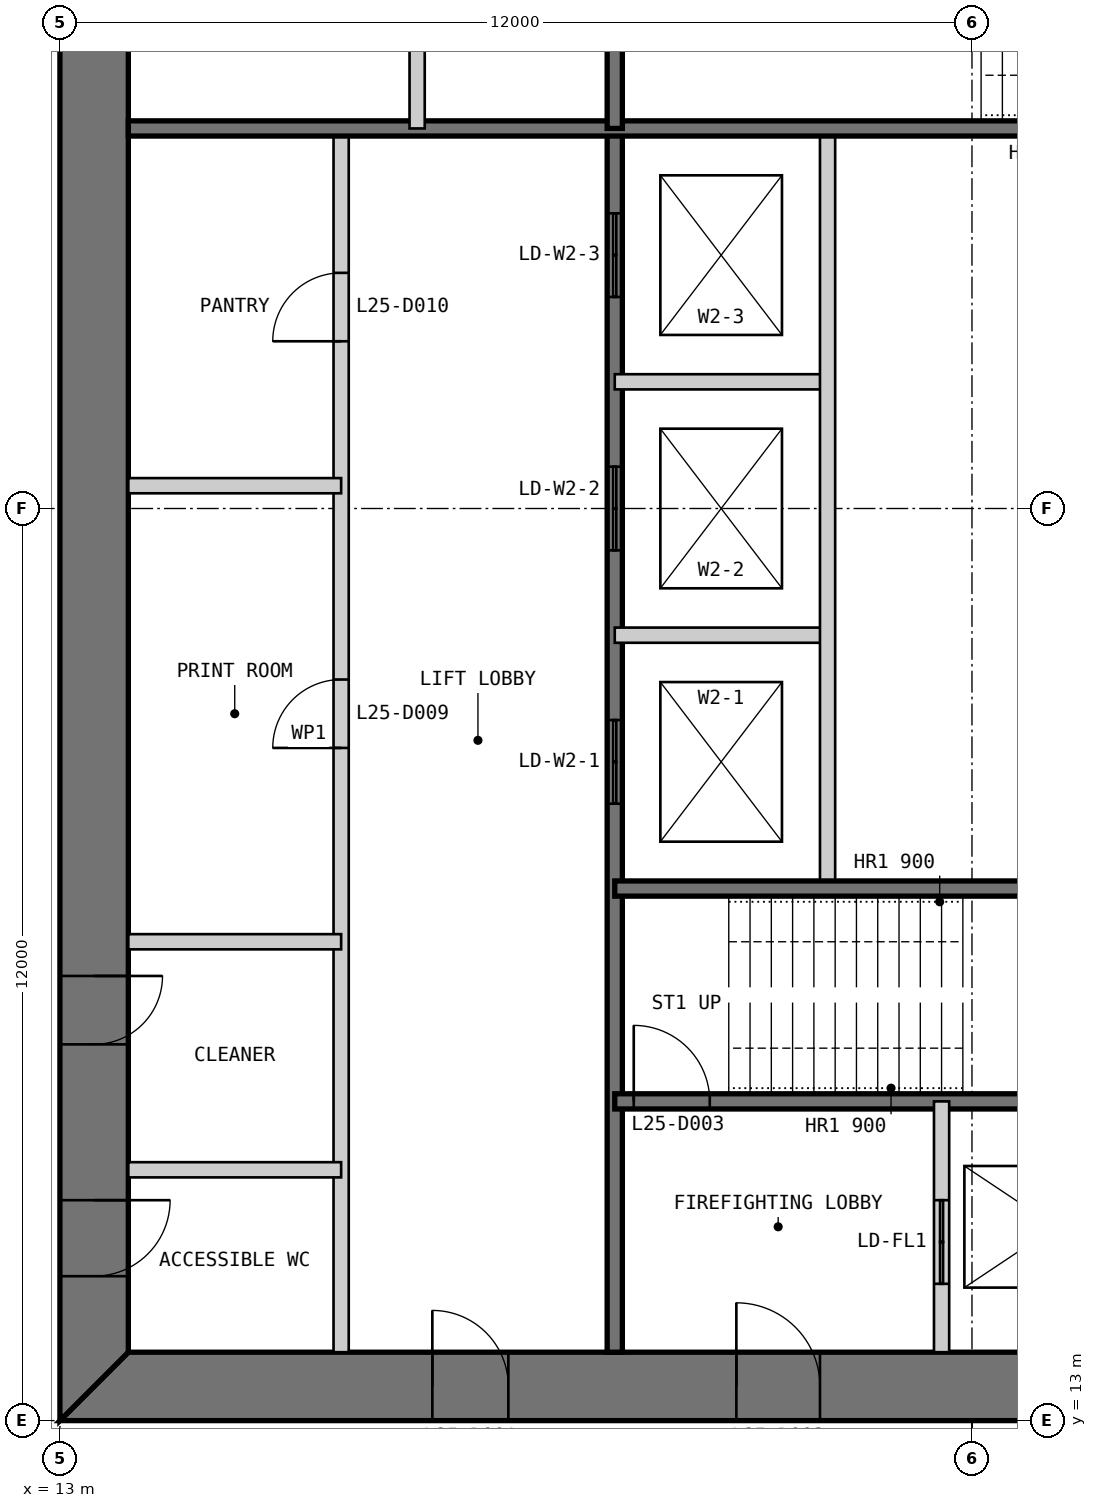
"""IFC4 building model, lengths in metres.
Left out: names, types, materials, properties, quantities, classifications, styles, units other than length and angle.
Written with IfcOpenShell. Run it as: python <this file> out.ifc"""

import sys

from ifc_helpers import new_model, si_unit, direction, frame, frame_2d, origin, place, context, subcontext, project, spatial, polyline, rectangle, outline, extrude, element, fill, save


model = new_model("IFC4")
c1 = context("Model", 3, precision=1e-05, world=origin(), true_north=direction((0.0, 1.0)))
c2 = subcontext(c1, "Body", "Model", "MODEL_VIEW")
j1 = project(units=[si_unit("LENGTHUNIT", "METRE"), si_unit("PLANEANGLEUNIT", "RADIAN")], contexts=[c1])
p1 = place(None, origin())
s1 = spatial("IfcSite", under=j1, at=p1, CompositionType="ELEMENT")
p2 = place(p1, origin())
s2 = spatial("IfcBuilding", under=s1, at=p2, CompositionType="ELEMENT")
p3 = place(p2, frame((0.0, 0.0, 110.4)))
s3 = spatial("IfcBuildingStorey", under=s2, at=p3, CompositionType="ELEMENT", Elevation=110.4)
p4 = place(p3, frame((13.0, 13.45, 0.0), z_axis=(0.0, 0.0, 1.0), x_axis=(1.0, 0.0, 0.0)))
e1 = element("IfcWall", 1, at=p4, inside=s3, PredefinedType="SHEAR", context=c2, shape_type="SweptSolid", body=[
    extrude(outline(polyline([(0.0, -0.45), (24.0, -0.45), (23.1, 0.45), (0.9, 0.45), (0.0, -0.45)])), origin(), (0.0, 0.0, 1.0), 4.0),
])
p5 = place(p4, frame((4.9, 0.0, 0.0)))
e2 = element("IfcOpeningElement", 2, at=p5, cuts=e1, PredefinedType="OPENING", context=c2, shape_type="SweptSolid", body=[
    extrude(rectangle(XDim=1.0, YDim=2.2, at=frame_2d((0.5, 1.1))), frame((0.0, 0.46, 0.0), z_axis=(0.0, -1.0, 0.0), x_axis=(1.0, 0.0, 0.0)), (0.0, 0.0, 1.0), 0.92),
])
p6 = place(p4, frame((8.9, 0.0, 0.0)))
e3 = element("IfcOpeningElement", 3, at=p6, cuts=e1, PredefinedType="OPENING", context=c2, shape_type="SweptSolid", body=[
    extrude(rectangle(XDim=1.1, YDim=2.2, at=frame_2d((0.55, 1.1))), frame((0.0, 0.46, 0.0), z_axis=(0.0, -1.0, 0.0), x_axis=(1.0, 0.0, 0.0)), (0.0, 0.0, 1.0), 0.92),
])
p7 = place(p4, frame((15.05, 0.0, 0.0)))
e4 = element("IfcOpeningElement", 4, at=p7, cuts=e1, PredefinedType="OPENING", context=c2, shape_type="SweptSolid", body=[
    extrude(rectangle(XDim=0.9, YDim=2.2, at=frame_2d((0.45, 1.1))), frame((0.0, 0.46, 0.0), z_axis=(0.0, -1.0, 0.0), x_axis=(1.0, 0.0, 0.0)), (0.0, 0.0, 1.0), 0.92),
])
p8 = place(p4, frame((17.9, 0.0, 0.0)))
e5 = element("IfcOpeningElement", 5, at=p8, cuts=e1, PredefinedType="OPENING", context=c2, shape_type="SweptSolid", body=[
    extrude(rectangle(XDim=1.0, YDim=2.2, at=frame_2d((0.5, 1.1))), frame((0.0, 0.46, 0.0), z_axis=(0.0, -1.0, 0.0), x_axis=(1.0, 0.0, 0.0)), (0.0, 0.0, 1.0), 0.92),
])
p9 = place(p4, frame((21.4, 0.0, 0.0)))
e6 = element("IfcOpeningElement", 6, at=p9, cuts=e1, PredefinedType="OPENING", context=c2, shape_type="SweptSolid", body=[
    extrude(rectangle(XDim=1.0, YDim=2.2, at=frame_2d((0.5, 1.1))), frame((0.0, 0.46, 0.0), z_axis=(0.0, -1.0, 0.0), x_axis=(1.0, 0.0, 0.0)), (0.0, 0.0, 1.0), 0.92),
])
p10 = place(p3, frame((13.45, 36.1, 0.0), z_axis=(0.0, 0.0, 1.0), x_axis=(0.0, -1.0, 0.0)))
e7 = element("IfcWall", 7, at=p10, inside=s3, PredefinedType="SHEAR", context=c2, shape_type="SweptSolid", body=[
    extrude(outline(polyline([(-0.9, -0.45), (23.1, -0.45), (22.2, 0.45), (0.0, 0.45), (-0.9, -0.45)])), origin(), (0.0, 0.0, 1.0), 4.0),
])
p11 = place(p10, frame((20.2, 0.0, 0.0)))
e8 = element("IfcOpeningElement", 8, at=p11, cuts=e7, PredefinedType="OPENING", context=c2, shape_type="SweptSolid", body=[
    extrude(rectangle(XDim=1.0, YDim=2.2, at=frame_2d((0.5, 1.1))), frame((0.0, 0.46, 0.0), z_axis=(0.0, -1.0, 0.0), x_axis=(1.0, 0.0, 0.0)), (0.0, 0.0, 1.0), 0.92),
])
p12 = place(p10, frame((17.25, 0.0, 0.0)))
e9 = element("IfcOpeningElement", 9, at=p12, cuts=e7, PredefinedType="OPENING", context=c2, shape_type="SweptSolid", body=[
    extrude(rectangle(XDim=0.9, YDim=2.2, at=frame_2d((0.45, 1.1))), frame((0.0, 0.46, 0.0), z_axis=(0.0, -1.0, 0.0), x_axis=(1.0, 0.0, 0.0)), (0.0, 0.0, 1.0), 0.92),
])
p13 = place(p3, frame((16.7, 13.9, 0.0), z_axis=(0.0, 0.0, 1.0), x_axis=(0.0, 1.0, 0.0)))
e10 = element("IfcWall", 10, at=p13, inside=s3, PredefinedType="PARTITIONING", context=c2, shape_type="SweptSolid", body=[
    extrude(rectangle(XDim=16.1, YDim=0.2, at=frame_2d((8.05, 0.0))), origin(), (0.0, 0.0, 1.0), 3.8),
])
p14 = place(p13, frame((7.95, 0.0, 0.0)))
e11 = element("IfcOpeningElement", 11, at=p14, cuts=e10, PredefinedType="OPENING", context=c2, shape_type="SweptSolid", body=[
    extrude(rectangle(XDim=0.9, YDim=2.2, at=frame_2d((0.45, 1.1))), frame((0.0, 0.11, 0.0), z_axis=(0.0, -1.0, 0.0), x_axis=(1.0, 0.0, 0.0)), (0.0, 0.0, 1.0), 0.22),
])
p15 = place(p13, frame((13.3, 0.0, 0.0)))
e12 = element("IfcOpeningElement", 12, at=p15, cuts=e10, PredefinedType="OPENING", context=c2, shape_type="SweptSolid", body=[
    extrude(rectangle(XDim=0.9, YDim=2.2, at=frame_2d((0.45, 1.1))), frame((0.0, 0.11, 0.0), z_axis=(0.0, -1.0, 0.0), x_axis=(1.0, 0.0, 0.0)), (0.0, 0.0, 1.0), 0.22),
])
p16 = place(p3, frame((20.3, 13.9, 0.0), z_axis=(0.0, 0.0, 1.0), x_axis=(0.0, 1.0, 0.0)))
e13 = element("IfcWall", 13, at=p16, inside=s3, PredefinedType="SOLIDWALL", context=c2, shape_type="SweptSolid", body=[
    extrude(rectangle(XDim=16.1, YDim=0.2, at=frame_2d((8.05, 0.0))), origin(), (0.0, 0.0, 1.0), 3.8),
])
p17 = place(p16, frame((7.217, 0.0, 0.0)))
e14 = element("IfcOpeningElement", 14, at=p17, cuts=e13, PredefinedType="OPENING", context=c2, shape_type="SweptSolid", body=[
    extrude(rectangle(XDim=1.1, YDim=2.2, at=frame_2d((0.55, 1.1))), frame((0.0, 0.11, 0.0), z_axis=(0.0, -1.0, 0.0), x_axis=(1.0, 0.0, 0.0)), (0.0, 0.0, 1.0), 0.22),
])
p18 = place(p16, frame((10.55, 0.0, 0.0)))
e15 = element("IfcOpeningElement", 15, at=p18, cuts=e13, PredefinedType="OPENING", context=c2, shape_type="SweptSolid", body=[
    extrude(rectangle(XDim=1.1, YDim=2.2, at=frame_2d((0.55, 1.1))), frame((0.0, 0.11, 0.0), z_axis=(0.0, -1.0, 0.0), x_axis=(1.0, 0.0, 0.0)), (0.0, 0.0, 1.0), 0.22),
])
p19 = place(p16, frame((13.883, 0.0, 0.0)))
e16 = element("IfcOpeningElement", 16, at=p19, cuts=e13, PredefinedType="OPENING", context=c2, shape_type="SweptSolid", body=[
    extrude(rectangle(XDim=1.1, YDim=2.2, at=frame_2d((0.55, 1.1))), frame((0.0, 0.11, 0.0), z_axis=(0.0, -1.0, 0.0), x_axis=(1.0, 0.0, 0.0)), (0.0, 0.0, 1.0), 0.22),
])
for number, where, z_axis, x_axis in (
    (17, (20.3, 23.333, 0.0), (0.0, 0.0, 1.0), (1.0, 0.0, 0.0)),
    (18, (20.3, 26.667, 0.0), (0.0, 0.0, 1.0), (1.0, 0.0, 0.0)),
):
    element("IfcWall", number, at=place(p3, frame(where, z_axis=z_axis, x_axis=x_axis)), inside=s3, PredefinedType="PARTITIONING", context=c2, shape_type="SweptSolid", body=[
        extrude(rectangle(XDim=2.8, YDim=0.2, at=frame_2d((1.4, 0.0))), origin(), (0.0, 0.0, 1.0), 3.8),
    ])
p20 = place(p3, frame((23.1, 20.0, 0.0), z_axis=(0.0, 0.0, 1.0), x_axis=(0.0, 1.0, 0.0)))
e19 = element("IfcWall", 19, at=p20, inside=s3, PredefinedType="PARTITIONING", context=c2, shape_type="SweptSolid", body=[
    extrude(rectangle(XDim=10.0, YDim=0.2, at=frame_2d((5.0, 0.0))), origin(), (0.0, 0.0, 1.0), 3.8),
])
p21 = place(p3, frame((20.3, 17.2, 0.0), z_axis=(0.0, 0.0, 1.0), x_axis=(1.0, 0.0, 0.0)))
e20 = element("IfcWall", 20, at=p21, inside=s3, PredefinedType="SOLIDWALL", context=c2, shape_type="SweptSolid", body=[
    extrude(rectangle(XDim=9.4, YDim=0.2, at=frame_2d((4.7, 0.0))), origin(), (0.0, 0.0, 1.0), 3.8),
])
p22 = place(p21, frame((0.25, 0.0, 0.0)))
e21 = element("IfcOpeningElement", 21, at=p22, cuts=e20, PredefinedType="OPENING", context=c2, shape_type="SweptSolid", body=[
    extrude(rectangle(XDim=1.0, YDim=2.2, at=frame_2d((0.5, 1.1))), frame((0.0, 0.11, 0.0), z_axis=(0.0, -1.0, 0.0), x_axis=(1.0, 0.0, 0.0)), (0.0, 0.0, 1.0), 0.22),
])
p23 = place(p3, frame((20.3, 20.0, 0.0), z_axis=(0.0, 0.0, 1.0), x_axis=(1.0, 0.0, 0.0)))
e22 = element("IfcWall", 22, at=p23, inside=s3, PredefinedType="SOLIDWALL", context=c2, shape_type="SweptSolid", body=[
    extrude(rectangle(XDim=15.8, YDim=0.2, at=frame_2d((7.9, 0.0))), origin(), (0.0, 0.0, 1.0), 3.8),
])
p24 = place(p3, frame((24.6, 13.9, 0.0), z_axis=(0.0, 0.0, 1.0), x_axis=(0.0, 1.0, 0.0)))
e23 = element("IfcWall", 23, at=p24, inside=s3, PredefinedType="PARTITIONING", context=c2, shape_type="SweptSolid", body=[
    extrude(rectangle(XDim=3.3, YDim=0.2, at=frame_2d((1.65, 0.0))), origin(), (0.0, 0.0, 1.0), 3.8),
])
p25 = place(p24, frame((0.9, 0.0, 0.0)))
e24 = element("IfcOpeningElement", 24, at=p25, cuts=e23, PredefinedType="OPENING", context=c2, shape_type="SweptSolid", body=[
    extrude(rectangle(XDim=1.1, YDim=2.2, at=frame_2d((0.55, 1.1))), frame((0.0, 0.11, 0.0), z_axis=(0.0, -1.0, 0.0), x_axis=(1.0, 0.0, 0.0)), (0.0, 0.0, 1.0), 0.22),
])
for number, where, z_axis, x_axis in (
    (25, (13.9, 16.3, 0.0), (0.0, 0.0, 1.0), (1.0, 0.0, 0.0)),
    (26, (13.9, 19.3, 0.0), (0.0, 0.0, 1.0), (1.0, 0.0, 0.0)),
    (27, (13.9, 25.3, 0.0), (0.0, 0.0, 1.0), (1.0, 0.0, 0.0)),
):
    element("IfcWall", number, at=place(p3, frame(where, z_axis=z_axis, x_axis=x_axis)), inside=s3, PredefinedType="PARTITIONING", context=c2, shape_type="SweptSolid", body=[
        extrude(rectangle(XDim=2.8, YDim=0.2, at=frame_2d((1.4, 0.0))), origin(), (0.0, 0.0, 1.0), 3.8),
    ])
p26 = place(p3, frame((29.7, 30.0, 0.0), z_axis=(0.0, 0.0, 1.0), x_axis=(-1.0, 0.0, 0.0)))
e28 = element("IfcWall", 28, at=p26, inside=s3, PredefinedType="SOLIDWALL", context=c2, shape_type="SweptSolid", body=[
    extrude(rectangle(XDim=15.8, YDim=0.2, at=frame_2d((7.9, 0.0))), origin(), (0.0, 0.0, 1.0), 3.8),
])
p27 = place(p3, frame((20.3, 36.1, 0.0), z_axis=(0.0, 0.0, 1.0), x_axis=(0.0, -1.0, 0.0)))
e29 = element("IfcWall", 29, at=p27, inside=s3, PredefinedType="SOLIDWALL", context=c2, shape_type="SweptSolid", body=[
    extrude(rectangle(XDim=6.1, YDim=0.2, at=frame_2d((3.05, 0.0))), origin(), (0.0, 0.0, 1.0), 3.8),
])
p28 = place(p3, frame((17.7, 36.1, 0.0), z_axis=(0.0, 0.0, 1.0), x_axis=(0.0, -1.0, 0.0)))
e30 = element("IfcWall", 30, at=p28, inside=s3, PredefinedType="PARTITIONING", context=c2, shape_type="SweptSolid", body=[
    extrude(rectangle(XDim=6.1, YDim=0.2, at=frame_2d((3.05, 0.0))), origin(), (0.0, 0.0, 1.0), 3.8),
])
p29 = place(p5, origin())
e31 = element("IfcDoor", 31, at=p29, inside=s3, OperationType="SINGLE_SWING_LEFT", PredefinedType="DOOR", context=c2, shape_type="SweptSolid", body=[
    extrude(rectangle(XDim=1.0, YDim=2.2, at=frame_2d((0.5, 1.1))), frame((0.0, 0.025, 0.0), z_axis=(0.0, -1.0, 0.0), x_axis=(1.0, 0.0, 0.0)), (0.0, 0.0, 1.0), 0.05),
    extrude(outline(polyline([(0.0, 0.0), (0.04, 0.0), (0.04, 2.16), (0.96, 2.16), (0.96, 0.0), (1.0, 0.0), (1.0, 2.2), (0.0, 2.2), (0.0, 0.0)])), frame((0.0, 0.3, 0.0), z_axis=(0.0, -1.0, 0.0), x_axis=(1.0, 0.0, 0.0)), (0.0, 0.0, 1.0), 0.6),
])
fill(e2, e31)
p30 = place(p6, origin())
e32 = element("IfcDoor", 32, at=p30, inside=s3, OperationType="SINGLE_SWING_LEFT", PredefinedType="DOOR", context=c2, shape_type="SweptSolid", body=[
    extrude(rectangle(XDim=1.1, YDim=2.2, at=frame_2d((0.55, 1.1))), frame((0.0, 0.025, 0.0), z_axis=(0.0, -1.0, 0.0), x_axis=(1.0, 0.0, 0.0)), (0.0, 0.0, 1.0), 0.05),
    extrude(outline(polyline([(0.0, 0.0), (0.04, 0.0), (0.04, 2.16), (1.06, 2.16), (1.06, 0.0), (1.1, 0.0), (1.1, 2.2), (0.0, 2.2), (0.0, 0.0)])), frame((0.0, 0.3, 0.0), z_axis=(0.0, -1.0, 0.0), x_axis=(1.0, 0.0, 0.0)), (0.0, 0.0, 1.0), 0.6),
])
fill(e3, e32)
p31 = place(p22, origin())
e33 = element("IfcDoor", 33, at=p31, inside=s3, OperationType="SINGLE_SWING_LEFT", PredefinedType="DOOR", context=c2, shape_type="SweptSolid", body=[
    extrude(rectangle(XDim=1.0, YDim=2.2, at=frame_2d((0.5, 1.1))), frame((0.0, 0.025, 0.0), z_axis=(0.0, -1.0, 0.0), x_axis=(1.0, 0.0, 0.0)), (0.0, 0.0, 1.0), 0.05),
])
fill(e21, e33)
p32 = place(p11, origin())
e34 = element("IfcDoor", 34, at=p32, inside=s3, OperationType="SINGLE_SWING_LEFT", PredefinedType="DOOR", context=c2, shape_type="SweptSolid", body=[
    extrude(rectangle(XDim=1.0, YDim=2.2, at=frame_2d((0.5, 1.1))), frame((0.0, 0.025, 0.0), z_axis=(0.0, -1.0, 0.0), x_axis=(1.0, 0.0, 0.0)), (0.0, 0.0, 1.0), 0.05),
    extrude(outline(polyline([(0.0, 0.0), (0.04, 0.0), (0.04, 2.16), (0.96, 2.16), (0.96, 0.0), (1.0, 0.0), (1.0, 2.2), (0.0, 2.2), (0.0, 0.0)])), frame((0.0, 0.3, 0.0), z_axis=(0.0, -1.0, 0.0), x_axis=(1.0, 0.0, 0.0)), (0.0, 0.0, 1.0), 0.6),
])
fill(e8, e34)
p33 = place(p12, origin())
e35 = element("IfcDoor", 35, at=p33, inside=s3, OperationType="SINGLE_SWING_LEFT", PredefinedType="DOOR", context=c2, shape_type="SweptSolid", body=[
    extrude(rectangle(XDim=0.9, YDim=2.2, at=frame_2d((0.45, 1.1))), frame((0.0, 0.025, 0.0), z_axis=(0.0, -1.0, 0.0), x_axis=(1.0, 0.0, 0.0)), (0.0, 0.0, 1.0), 0.05),
    extrude(outline(polyline([(0.0, 0.0), (0.04, 0.0), (0.04, 2.16), (0.86, 2.16), (0.86, 0.0), (0.9, 0.0), (0.9, 2.2), (0.0, 2.2), (0.0, 0.0)])), frame((0.0, 0.3, 0.0), z_axis=(0.0, -1.0, 0.0), x_axis=(1.0, 0.0, 0.0)), (0.0, 0.0, 1.0), 0.6),
])
fill(e9, e35)
p34 = place(p14, origin())
e36 = element("IfcDoor", 36, at=p34, inside=s3, OperationType="SINGLE_SWING_LEFT", PredefinedType="DOOR", context=c2, shape_type="SweptSolid", body=[
    extrude(rectangle(XDim=0.9, YDim=2.2, at=frame_2d((0.45, 1.1))), frame((0.0, 0.025, 0.0), z_axis=(0.0, -1.0, 0.0), x_axis=(1.0, 0.0, 0.0)), (0.0, 0.0, 1.0), 0.05),
])
fill(e11, e36)
p35 = place(p15, origin())
e37 = element("IfcDoor", 37, at=p35, inside=s3, OperationType="SINGLE_SWING_LEFT", PredefinedType="DOOR", context=c2, shape_type="SweptSolid", body=[
    extrude(rectangle(XDim=0.9, YDim=2.2, at=frame_2d((0.45, 1.1))), frame((0.0, 0.025, 0.0), z_axis=(0.0, -1.0, 0.0), x_axis=(1.0, 0.0, 0.0)), (0.0, 0.0, 1.0), 0.05),
])
fill(e12, e37)
p36 = place(p25, origin())
e38 = element("IfcDoor", 38, at=p36, inside=s3, OperationType="DOUBLE_DOOR_SLIDING", PredefinedType="DOOR", context=c2, shape_type="SweptSolid", body=[
    extrude(rectangle(XDim=1.1, YDim=2.2, at=frame_2d((0.55, 1.1))), frame((0.0, 0.025, 0.0), z_axis=(0.0, -1.0, 0.0), x_axis=(1.0, 0.0, 0.0)), (0.0, 0.0, 1.0), 0.05),
])
fill(e24, e38)
p37 = place(p17, origin())
e39 = element("IfcDoor", 39, at=p37, inside=s3, OperationType="DOUBLE_DOOR_SLIDING", PredefinedType="DOOR", context=c2, shape_type="SweptSolid", body=[
    extrude(rectangle(XDim=1.1, YDim=2.2, at=frame_2d((0.55, 1.1))), frame((0.0, 0.025, 0.0), z_axis=(0.0, -1.0, 0.0), x_axis=(1.0, 0.0, 0.0)), (0.0, 0.0, 1.0), 0.05),
])
fill(e14, e39)
p38 = place(p18, origin())
e40 = element("IfcDoor", 40, at=p38, inside=s3, OperationType="DOUBLE_DOOR_SLIDING", PredefinedType="DOOR", context=c2, shape_type="SweptSolid", body=[
    extrude(rectangle(XDim=1.1, YDim=2.2, at=frame_2d((0.55, 1.1))), frame((0.0, 0.025, 0.0), z_axis=(0.0, -1.0, 0.0), x_axis=(1.0, 0.0, 0.0)), (0.0, 0.0, 1.0), 0.05),
])
fill(e15, e40)
p39 = place(p19, origin())
e41 = element("IfcDoor", 41, at=p39, inside=s3, OperationType="DOUBLE_DOOR_SLIDING", PredefinedType="DOOR", context=c2, shape_type="SweptSolid", body=[
    extrude(rectangle(XDim=1.1, YDim=2.2, at=frame_2d((0.55, 1.1))), frame((0.0, 0.025, 0.0), z_axis=(0.0, -1.0, 0.0), x_axis=(1.0, 0.0, 0.0)), (0.0, 0.0, 1.0), 0.05),
])
fill(e16, e41)
save(model, sys.argv[1])
